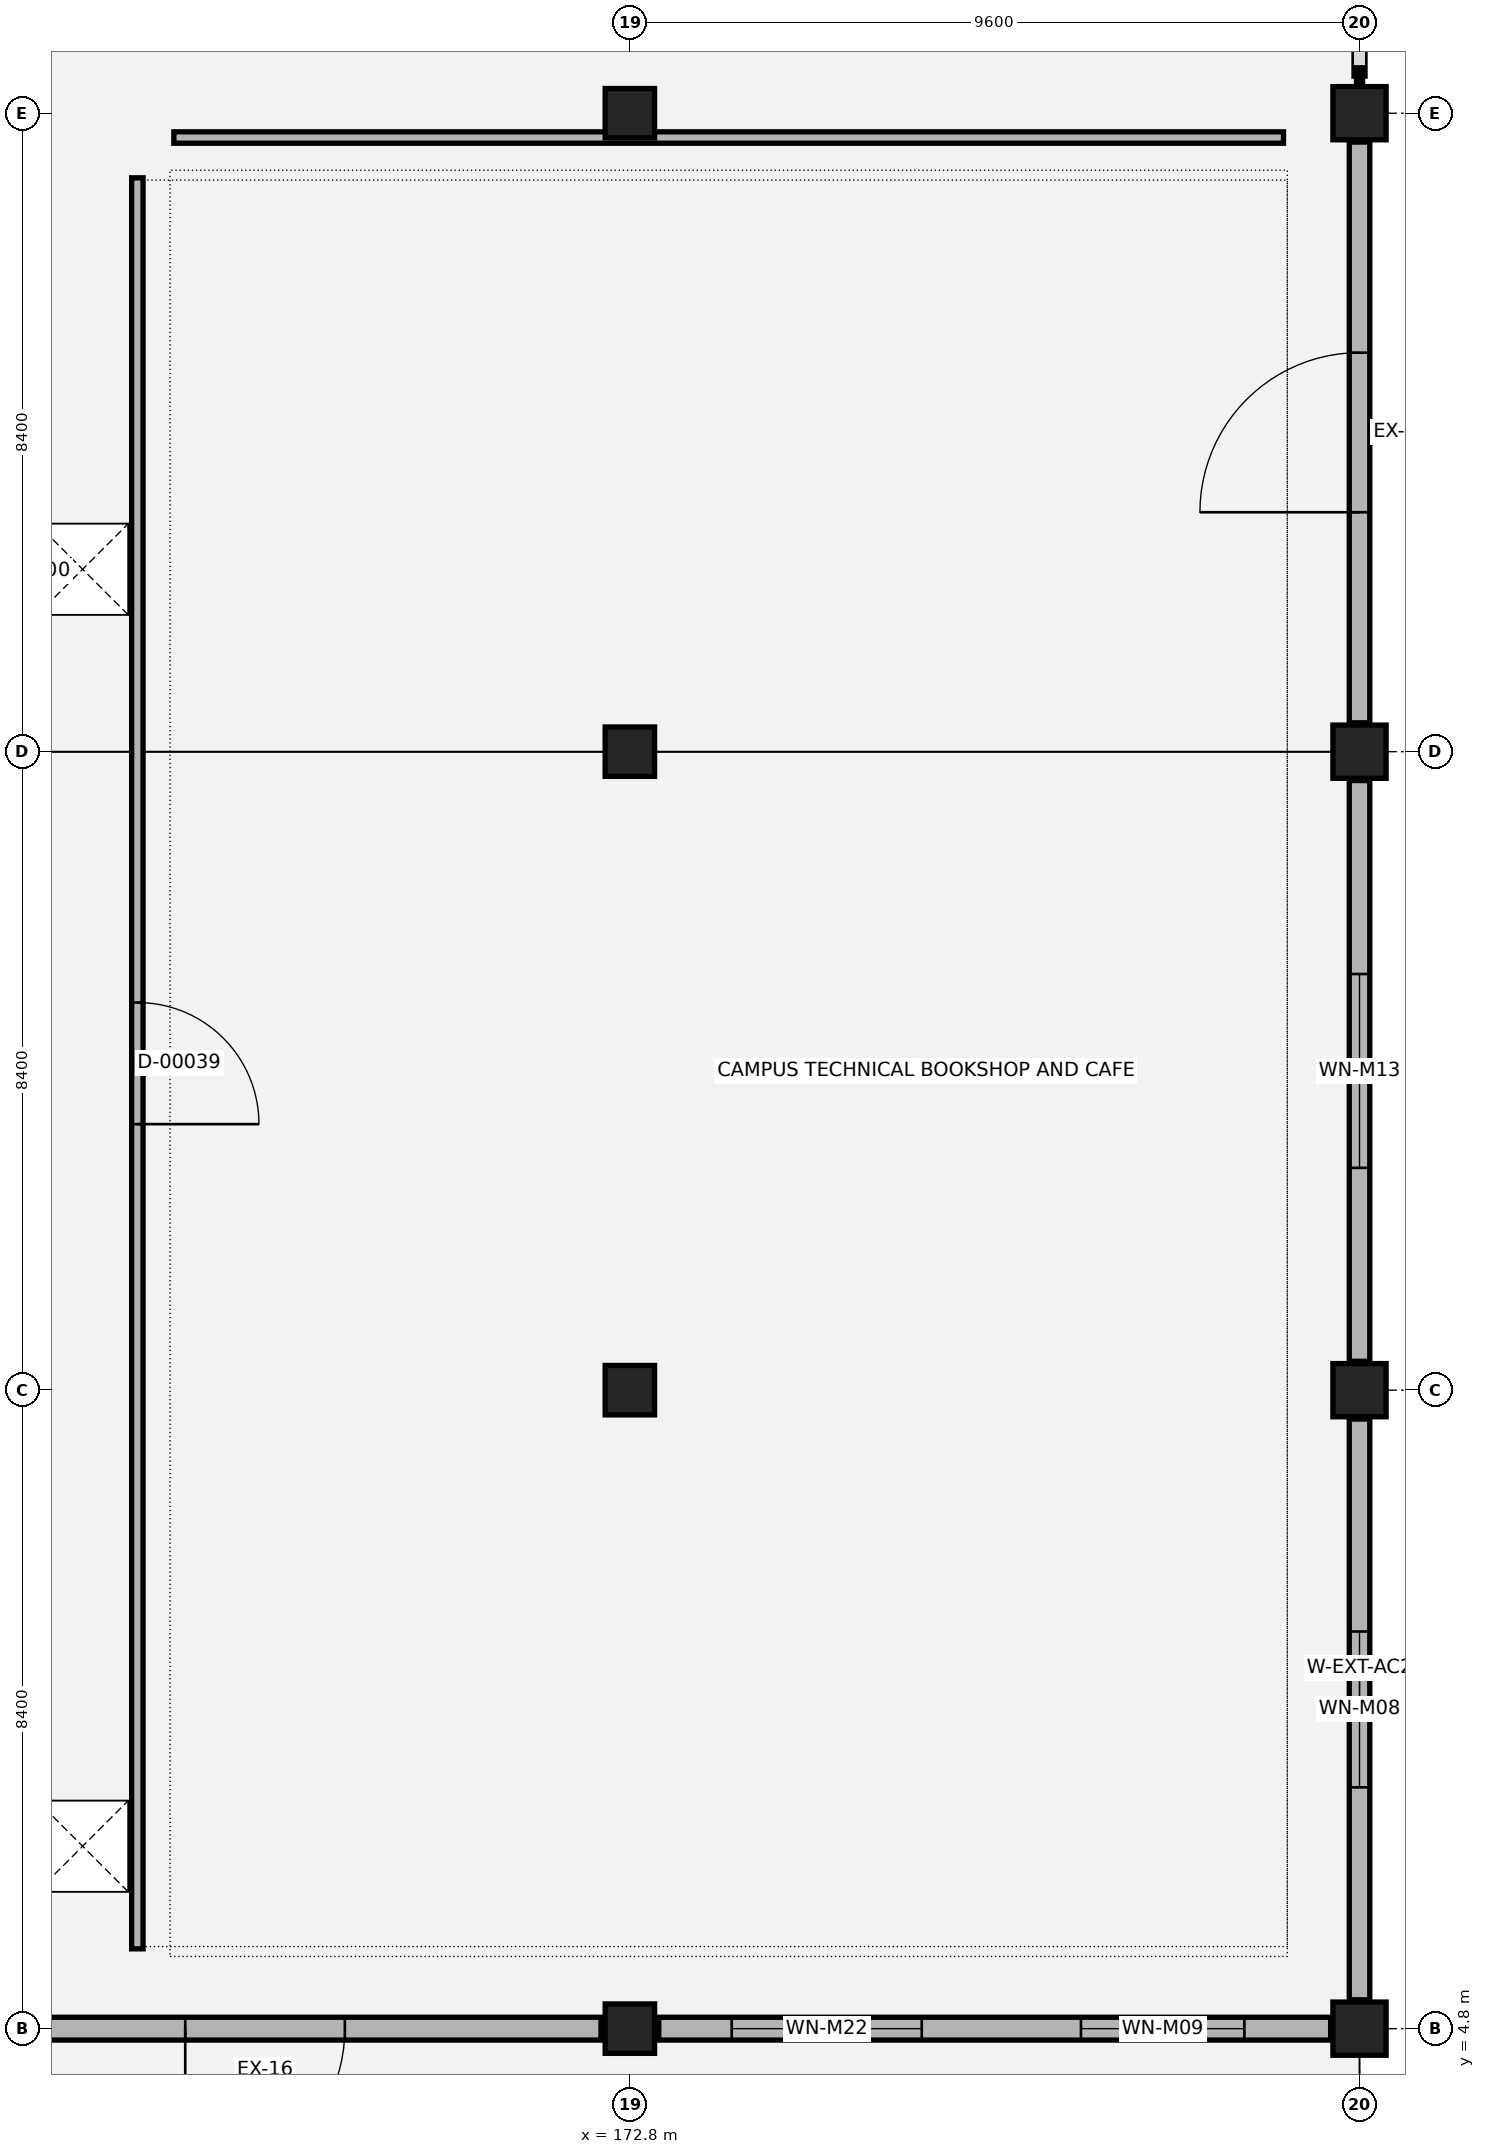
"""IFC4 building model, lengths in metres.
Left out: names, types, materials, properties, quantities, classifications, styles, units other than length and angle.
Written with IfcOpenShell. Run it as: python <this file> out.ifc"""

import sys

from ifc_helpers import new_model, si_unit, direction, frame, frame_2d, origin, origin_2d, place, context, subcontext, project, spatial, rectangle, extrude, element, fill, save


model = new_model("IFC4")
c1 = context("Model", 3, precision=1e-05, world=origin(), true_north=direction((0.0, 1.0)))
c2 = subcontext(c1, "Body", "Model", "MODEL_VIEW")
j1 = project(units=[si_unit("LENGTHUNIT", "METRE"), si_unit("PLANEANGLEUNIT", "RADIAN")], contexts=[c1])
p1 = place(None, origin())
s1 = spatial("IfcSite", under=j1, at=p1, CompositionType="ELEMENT")
p2 = place(p1, origin())
s2 = spatial("IfcBuilding", under=s1, at=p2, CompositionType="ELEMENT")
p3 = place(p2, origin())
s3 = spatial("IfcBuildingStorey", under=s2, at=p3, CompositionType="ELEMENT", Elevation=0.0)
for number, where, z_axis, x_axis in (
    (1, (172.8, 4.8, 0.0), (0.0, 0.0, 1.0), (1.0, 0.0, 0.0)),
    (2, (172.8, 13.2, 0.0), (0.0, 0.0, 1.0), (1.0, 0.0, 0.0)),
    (3, (172.8, 21.6, 0.0), (0.0, 0.0, 1.0), (1.0, 0.0, 0.0)),
    (4, (172.8, 30.0, 0.0), (0.0, 0.0, 1.0), (1.0, 0.0, 0.0)),
):
    element("IfcColumn", number, at=place(p3, frame(where, z_axis=z_axis, x_axis=x_axis)), inside=s3, PredefinedType="COLUMN", context=c2, shape_type="SweptSolid", body=[
        extrude(rectangle(XDim=0.65, YDim=0.65, at=origin_2d()), origin(), (0.0, 0.0, 1.0), 5.4),
    ])
for number, where, z_axis, x_axis in (
    (5, (182.4, 4.8, 0.0), (0.0, 0.0, 1.0), (1.0, 0.0, 0.0)),
    (6, (182.4, 13.2, 0.0), (0.0, 0.0, 1.0), (1.0, 0.0, 0.0)),
    (7, (182.4, 21.6, 0.0), (0.0, 0.0, 1.0), (1.0, 0.0, 0.0)),
    (8, (182.4, 30.0, 0.0), (0.0, 0.0, 1.0), (1.0, 0.0, 0.0)),
):
    element("IfcColumn", number, at=place(p3, frame(where, z_axis=z_axis, x_axis=x_axis)), inside=s3, PredefinedType="COLUMN", context=c2, shape_type="SweptSolid", body=[
        extrude(rectangle(XDim=0.7, YDim=0.7, at=origin_2d()), origin(), (0.0, 0.0, 1.0), 5.4),
    ])
p4 = place(p3, frame((182.4, 5.18, 0.0), z_axis=(0.0, 0.0, 1.0), x_axis=(0.0, 1.0, 0.0)))
e9 = element("IfcWall", 9, at=p4, inside=s3, PredefinedType="SOLIDWALL", context=c2, shape_type="SweptSolid", body=[
    extrude(rectangle(XDim=7.64, YDim=0.27, at=frame_2d((3.82, 0.0))), origin(), (0.0, 0.0, 1.0), 4.04),
])
p5 = place(p4, frame((2.795, 0.0, 0.9)))
e10 = element("IfcOpeningElement", 10, at=p5, cuts=e9, PredefinedType="OPENING", context=c2, shape_type="SweptSolid", body=[
    extrude(rectangle(XDim=2.05, YDim=1.6, at=frame_2d((1.025, 0.8))), frame((0.0, 0.145, 0.0), z_axis=(0.0, -1.0, 0.0), x_axis=(1.0, 0.0, 0.0)), (0.0, 0.0, 1.0), 0.29),
])
p6 = place(p3, frame((182.4, 13.58, 0.0), z_axis=(0.0, 0.0, 1.0), x_axis=(0.0, 1.0, 0.0)))
e11 = element("IfcWall", 11, at=p6, inside=s3, PredefinedType="SOLIDWALL", context=c2, shape_type="SweptSolid", body=[
    extrude(rectangle(XDim=7.64, YDim=0.27, at=frame_2d((3.82, 0.0))), origin(), (0.0, 0.0, 1.0), 4.04),
])
p7 = place(p6, frame((2.545, 0.0, 0.9)))
e12 = element("IfcOpeningElement", 12, at=p7, cuts=e11, PredefinedType="OPENING", context=c2, shape_type="SweptSolid", body=[
    extrude(rectangle(XDim=2.55, YDim=1.75, at=frame_2d((1.275, 0.875))), frame((0.0, 0.145, 0.0), z_axis=(0.0, -1.0, 0.0), x_axis=(1.0, 0.0, 0.0)), (0.0, 0.0, 1.0), 0.29),
])
p8 = place(p3, frame((182.4, 21.98, 0.0), z_axis=(0.0, 0.0, 1.0), x_axis=(0.0, 1.0, 0.0)))
e13 = element("IfcWall", 13, at=p8, inside=s3, PredefinedType="SOLIDWALL", context=c2, shape_type="SweptSolid", body=[
    extrude(rectangle(XDim=7.64, YDim=0.27, at=frame_2d((3.82, 0.0))), origin(), (0.0, 0.0, 1.0), 4.04),
])
p9 = place(p8, frame((2.77, 0.0, 0.0)))
e14 = element("IfcOpeningElement", 14, at=p9, cuts=e13, PredefinedType="OPENING", context=c2, shape_type="SweptSolid", body=[
    extrude(rectangle(XDim=2.1, YDim=2.2, at=frame_2d((1.05, 1.1))), frame((0.0, 0.145, 0.0), z_axis=(0.0, -1.0, 0.0), x_axis=(1.0, 0.0, 0.0)), (0.0, 0.0, 1.0), 0.29),
])
p10 = place(p3, frame((163.58, 4.8, 0.0), z_axis=(0.0, 0.0, 1.0), x_axis=(1.0, 0.0, 0.0)))
e15 = element("IfcWall", 15, at=p10, inside=s3, PredefinedType="SOLIDWALL", context=c2, shape_type="SweptSolid", body=[
    extrude(rectangle(XDim=8.84, YDim=0.3, at=frame_2d((4.42, 0.0))), origin(), (0.0, 0.0, 1.0), 4.04),
])
p11 = place(p10, frame((3.37, 0.0, 0.0)))
e16 = element("IfcOpeningElement", 16, at=p11, cuts=e15, PredefinedType="OPENING", context=c2, shape_type="SweptSolid", body=[
    extrude(rectangle(XDim=2.1, YDim=2.2, at=frame_2d((1.05, 1.1))), frame((0.0, 0.16, 0.0), z_axis=(0.0, -1.0, 0.0), x_axis=(1.0, 0.0, 0.0)), (0.0, 0.0, 1.0), 0.32),
])
p12 = place(p3, frame((173.18, 4.8, 0.0), z_axis=(0.0, 0.0, 1.0), x_axis=(1.0, 0.0, 0.0)))
e17 = element("IfcWall", 17, at=p12, inside=s3, PredefinedType="SOLIDWALL", context=c2, shape_type="SweptSolid", body=[
    extrude(rectangle(XDim=8.84, YDim=0.3, at=frame_2d((4.42, 0.0))), origin(), (0.0, 0.0, 1.0), 4.04),
])
p13 = place(p12, frame((0.96, 0.0, 0.9)))
e18 = element("IfcOpeningElement", 18, at=p13, cuts=e17, PredefinedType="OPENING", context=c2, shape_type="SweptSolid", body=[
    extrude(rectangle(XDim=2.5, YDim=1.65, at=frame_2d((1.25, 0.825))), frame((0.0, 0.16, 0.0), z_axis=(0.0, -1.0, 0.0), x_axis=(1.0, 0.0, 0.0)), (0.0, 0.0, 1.0), 0.32),
])
p14 = place(p12, frame((5.555, 0.0, 0.9)))
e19 = element("IfcOpeningElement", 19, at=p14, cuts=e17, PredefinedType="OPENING", context=c2, shape_type="SweptSolid", body=[
    extrude(rectangle(XDim=2.15, YDim=1.65, at=frame_2d((1.075, 0.825))), frame((0.0, 0.16, 0.0), z_axis=(0.0, -1.0, 0.0), x_axis=(1.0, 0.0, 0.0)), (0.0, 0.0, 1.0), 0.32),
])
p15 = place(p3, frame((166.32, 5.85, 0.0), z_axis=(0.0, 0.0, 1.0), x_axis=(0.0, 1.0, 0.0)))
e20 = element("IfcWall", 20, at=p15, inside=s3, PredefinedType="PARTITIONING", context=c2, shape_type="SweptSolid", body=[
    extrude(rectangle(XDim=23.3, YDim=0.15, at=frame_2d((11.65, 0.0))), origin(), (0.0, 0.0, 1.0), 4.04),
])
p16 = place(p15, frame((10.85, 0.0, 0.0)))
e21 = element("IfcOpeningElement", 21, at=p16, cuts=e20, PredefinedType="OPENING", context=c2, shape_type="SweptSolid", body=[
    extrude(rectangle(XDim=1.6, YDim=2.15, at=frame_2d((0.8, 1.075))), frame((0.0, 0.085, 0.0), z_axis=(0.0, -1.0, 0.0), x_axis=(1.0, 0.0, 0.0)), (0.0, 0.0, 1.0), 0.17),
])
p17 = place(p3, frame((166.8, 29.68, 0.0), z_axis=(0.0, 0.0, 1.0), x_axis=(1.0, 0.0, 0.0)))
e22 = element("IfcWall", 22, at=p17, inside=s3, PredefinedType="PARTITIONING", context=c2, shape_type="SweptSolid", body=[
    extrude(rectangle(XDim=14.6, YDim=0.15, at=frame_2d((7.3, 0.0))), origin(), (0.0, 0.0, 1.0), 4.04),
])
p18 = place(p5, origin())
e23 = element("IfcWindow", 23, at=p18, inside=s3, PartitioningType="SINGLE_PANEL", PredefinedType="WINDOW", context=c2, shape_type="SweptSolid", body=[
    extrude(rectangle(XDim=2.05, YDim=1.6, at=frame_2d((1.025, 0.8))), frame((0.0, 0.03, 0.0), z_axis=(0.0, -1.0, 0.0), x_axis=(1.0, 0.0, 0.0)), (0.0, 0.0, 1.0), 0.06),
])
fill(e10, e23)
p19 = place(p7, origin())
e24 = element("IfcWindow", 24, at=p19, inside=s3, PartitioningType="SINGLE_PANEL", PredefinedType="WINDOW", context=c2, shape_type="SweptSolid", body=[
    extrude(rectangle(XDim=2.55, YDim=1.75, at=frame_2d((1.275, 0.875))), frame((0.0, 0.03, 0.0), z_axis=(0.0, -1.0, 0.0), x_axis=(1.0, 0.0, 0.0)), (0.0, 0.0, 1.0), 0.06),
])
fill(e12, e24)
p20 = place(p9, origin())
e25 = element("IfcDoor", 25, at=p20, inside=s3, OperationType="SINGLE_SWING_LEFT", PredefinedType="DOOR", context=c2, shape_type="SweptSolid", body=[
    extrude(rectangle(XDim=2.1, YDim=2.2, at=frame_2d((1.05, 1.1))), frame((0.0, 0.025, 0.0), z_axis=(0.0, -1.0, 0.0), x_axis=(1.0, 0.0, 0.0)), (0.0, 0.0, 1.0), 0.05),
])
fill(e14, e25)
p21 = place(p11, origin())
e26 = element("IfcDoor", 26, at=p21, inside=s3, OperationType="SINGLE_SWING_RIGHT", PredefinedType="DOOR", context=c2, shape_type="SweptSolid", body=[
    extrude(rectangle(XDim=2.1, YDim=2.2, at=frame_2d((1.05, 1.1))), frame((0.0, 0.025, 0.0), z_axis=(0.0, -1.0, 0.0), x_axis=(1.0, 0.0, 0.0)), (0.0, 0.0, 1.0), 0.05),
])
fill(e16, e26)
p22 = place(p13, origin())
e27 = element("IfcWindow", 27, at=p22, inside=s3, PartitioningType="SINGLE_PANEL", PredefinedType="WINDOW", context=c2, shape_type="SweptSolid", body=[
    extrude(rectangle(XDim=2.5, YDim=1.65, at=frame_2d((1.25, 0.825))), frame((0.0, 0.03, 0.0), z_axis=(0.0, -1.0, 0.0), x_axis=(1.0, 0.0, 0.0)), (0.0, 0.0, 1.0), 0.06),
])
fill(e18, e27)
p23 = place(p14, origin())
e28 = element("IfcWindow", 28, at=p23, inside=s3, PartitioningType="SINGLE_PANEL", PredefinedType="WINDOW", context=c2, shape_type="SweptSolid", body=[
    extrude(rectangle(XDim=2.15, YDim=1.65, at=frame_2d((1.075, 0.825))), frame((0.0, 0.03, 0.0), z_axis=(0.0, -1.0, 0.0), x_axis=(1.0, 0.0, 0.0)), (0.0, 0.0, 1.0), 0.06),
])
fill(e19, e28)
p24 = place(p16, origin())
e29 = element("IfcDoor", 29, at=p24, inside=s3, OperationType="SINGLE_SWING_RIGHT", PredefinedType="DOOR", context=c2, shape_type="SweptSolid", body=[
    extrude(rectangle(XDim=1.6, YDim=2.15, at=frame_2d((0.8, 1.075))), frame((0.0, 0.025, 0.0), z_axis=(0.0, -1.0, 0.0), x_axis=(1.0, 0.0, 0.0)), (0.0, 0.0, 1.0), 0.05),
])
fill(e21, e29)
save(model, sys.argv[1])
